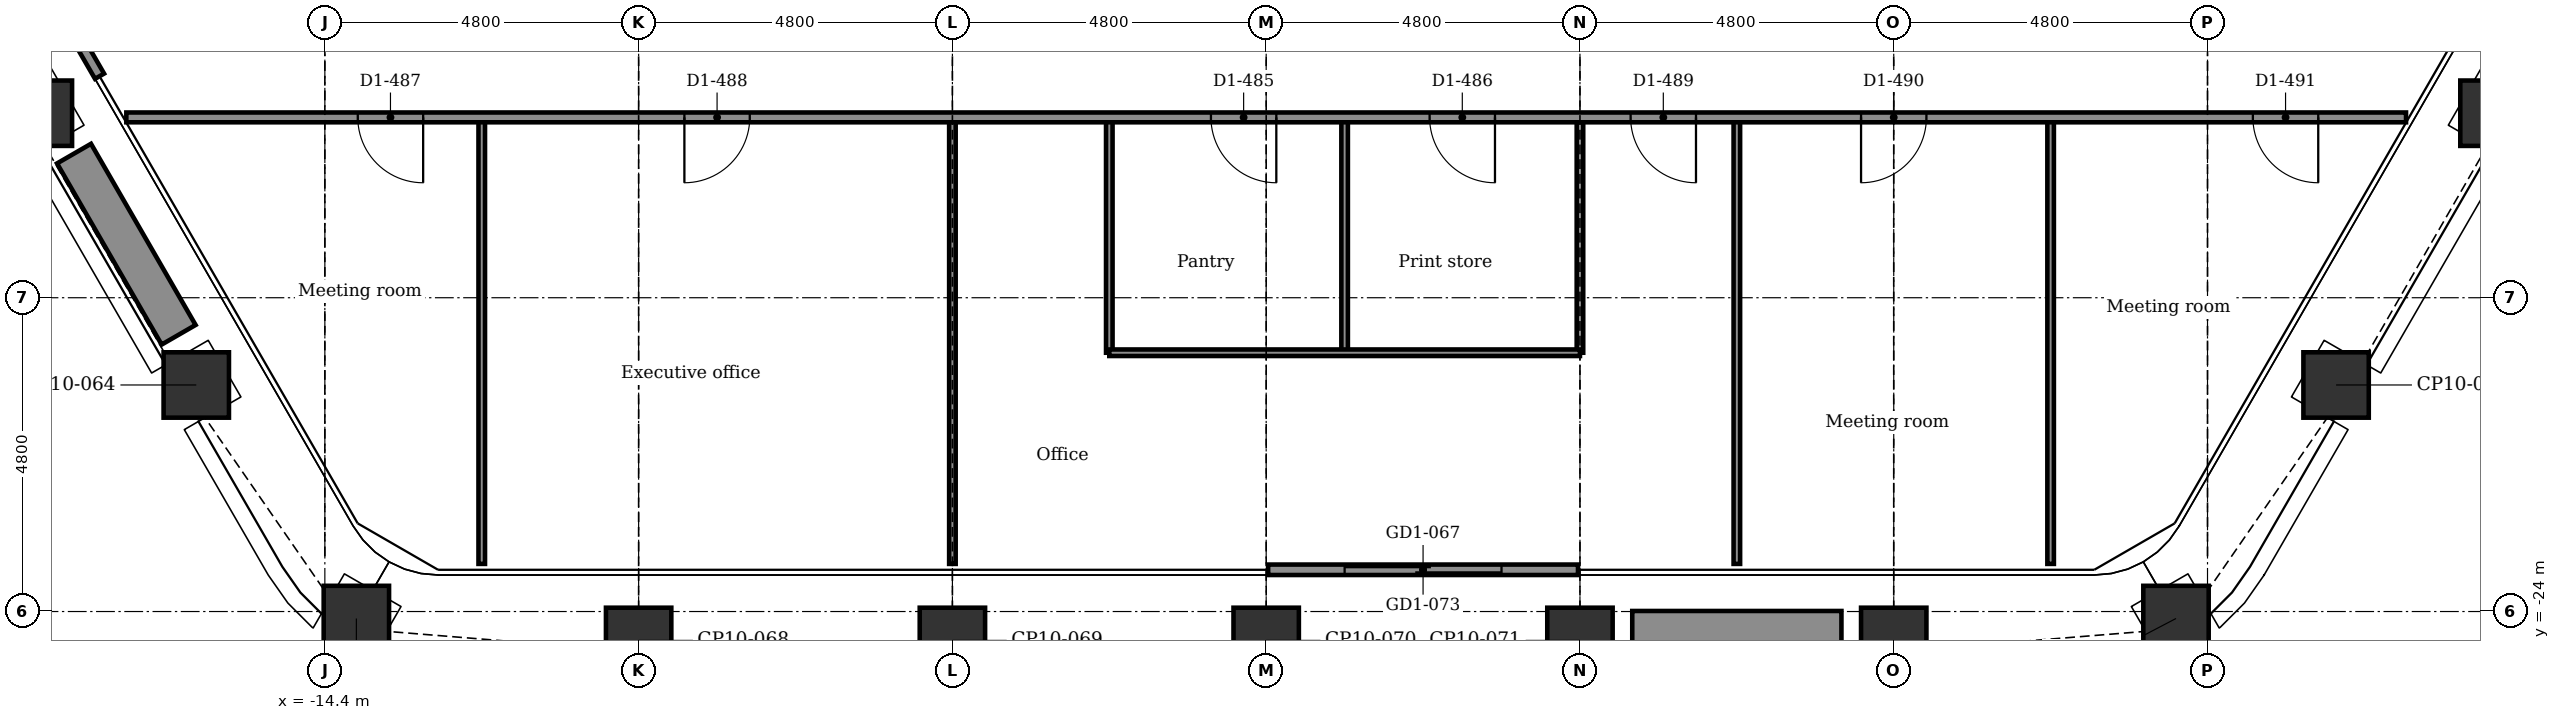
"""IFC4 building model, lengths in metres.
Left out: names, types, materials, properties, quantities, classifications, styles, units other than length and angle.
Written with IfcOpenShell. Run it as: python <this file> out.ifc"""

import sys

from ifc_helpers import new_model, si_unit, direction, frame, frame_2d, origin, origin_2d, place, context, subcontext, project, spatial, rectangle, extrude, element, fill, save


model = new_model("IFC4")
c1 = context("Model", 3, precision=1e-05, world=origin(), true_north=direction((0.0, 1.0)))
c2 = subcontext(c1, "Body", "Model", "MODEL_VIEW")
j1 = project(units=[si_unit("LENGTHUNIT", "METRE"), si_unit("PLANEANGLEUNIT", "RADIAN")], contexts=[c1])
p1 = place(None, origin())
s1 = spatial("IfcSite", under=j1, at=p1, CompositionType="ELEMENT")
p2 = place(p1, origin())
s2 = spatial("IfcBuilding", under=s1, at=p2, CompositionType="ELEMENT")
p3 = place(p2, frame((0.0, 0.0, 170.0)))
s3 = spatial("IfcBuildingStorey", under=s2, at=p3, CompositionType="ELEMENT", Elevation=170.0)
for number, where, z_axis, x_axis in (
    (1, (18.767, -16.378, -0.15), (0.0, 0.0, 1.0), (0.5, 0.866, 0.0)),
    (2, (16.367, -20.535, -0.15), (0.0, 0.0, 1.0), (0.5, 0.866, 0.0)),
    (3, (13.918, -24.107, -0.15), (0.0, 0.0, 1.0), (0.866, 0.5, 0.0)),
    (4, (9.6, -24.442, -0.15), (0.0, 0.0, 1.0), (1.0, 0.0, 0.0)),
    (5, (4.8, -24.442, -0.15), (0.0, 0.0, 1.0), (1.0, 0.0, 0.0)),
    (6, (0.0, -24.442, -0.15), (0.0, 0.0, 1.0), (1.0, 0.0, 0.0)),
    (7, (-4.8, -24.442, -0.15), (0.0, 0.0, 1.0), (1.0, 0.0, 0.0)),
    (8, (-9.6, -24.442, -0.15), (0.0, 0.0, 1.0), (1.0, 0.0, 0.0)),
    (9, (-13.918, -24.107, -0.15), (0.0, 0.0, 1.0), (0.5, 0.866, 0.0)),
    (10, (-16.367, -20.535, -0.15), (0.0, 0.0, 1.0), (0.866, 0.5, 0.0)),
    (11, (-18.767, -16.378, -0.15), (0.0, 0.0, 1.0), (0.866, 0.5, 0.0)),
):
    element("IfcColumn", number, at=place(p3, frame(where, z_axis=z_axis, x_axis=x_axis)), inside=s3, PredefinedType="COLUMN", context=c2, shape_type="SweptSolid", body=[
        extrude(rectangle(XDim=1.0, YDim=1.0, at=origin_2d()), origin(), (0.0, 0.0, 1.0), 3.9),
    ])
p4 = place(p3, frame((4.77, -23.362, 0.0), z_axis=(0.0, 0.0, 1.0), x_axis=(-1.0, 0.0, 0.0)))
e12 = element("IfcWall", 12, at=p4, inside=s3, PredefinedType="PARTITIONING", context=c2, shape_type="SweptSolid", body=[
    extrude(rectangle(XDim=4.74, YDim=0.16, at=frame_2d((2.37, 0.0))), origin(), (0.0, 0.0, 1.0), 3.75),
])
p5 = place(p4, frame((1.17, 0.0, 0.0)))
e13 = element("IfcOpeningElement", 13, at=p5, cuts=e12, PredefinedType="OPENING", context=c2, shape_type="SweptSolid", body=[
    extrude(rectangle(XDim=2.4, YDim=2.4, at=frame_2d((1.2, 1.2))), frame((0.0, 0.09, 0.0), z_axis=(0.0, -1.0, 0.0), x_axis=(1.0, 0.0, 0.0)), (0.0, 0.0, 1.0), 0.18),
])
p6 = place(p3, frame((-17.847, -15.812, 0.0), z_axis=(0.0, 0.0, 1.0), x_axis=(-0.5000167099, 0.866015756104, 0.0)))
e14 = element("IfcWall", 14, at=p6, inside=s3, PredefinedType="PARTITIONING", context=c2, shape_type="SweptSolid", body=[
    extrude(rectangle(XDim=4.74, YDim=0.16, at=frame_2d((2.37, 0.0))), origin(), (0.0, 0.0, 1.0), 3.75),
])
p7 = place(p6, frame((1.17, 0.0, 0.0)))
e15 = element("IfcOpeningElement", 15, at=p7, cuts=e14, PredefinedType="OPENING", context=c2, shape_type="SweptSolid", body=[
    extrude(rectangle(XDim=2.4, YDim=2.4, at=frame_2d((1.2, 1.2))), frame((0.0, 0.09, 0.0), z_axis=(0.0, -1.0, 0.0), x_axis=(1.0, 0.0, 0.0)), (0.0, 0.0, 1.0), 0.18),
])
for number, where, z_axis, x_axis in (
    (16, (8.8, -24.292, 0.0), (0.0, 0.0, 1.0), (-1.0, 0.0, 0.0)),
    (17, (-16.637, -19.767, 0.0), (0.0, 0.0, 1.0), (-0.5, 0.866, 0.0)),
):
    element("IfcWall", number, at=place(p3, frame(where, z_axis=z_axis, x_axis=x_axis)), inside=s3, PredefinedType="USERDEFINED", context=c2, shape_type="SweptSolid", body=[
        extrude(rectangle(XDim=3.2, YDim=0.6, at=frame_2d((1.6, 0.0))), origin(), (0.0, 0.0, 1.0), 0.7),
    ])
for number, where, z_axis, x_axis in (
    (18, (12.0, -23.271, 0.0), (0.0, 0.0, 1.0), (0.0, 1.0, 0.0)),
    (19, (7.2, -23.271, 0.0), (0.0, 0.0, 1.0), (0.0, 1.0, 0.0)),
):
    element("IfcWall", number, at=place(p3, frame(where, z_axis=z_axis, x_axis=x_axis)), inside=s3, PredefinedType="PARTITIONING", context=c2, shape_type="SweptSolid", body=[
        extrude(rectangle(XDim=6.83, YDim=0.1, at=frame_2d((3.415, 0.0))), origin(), (0.0, 0.0, 1.0), 3.75),
    ])
p8 = place(p3, frame((4.8, -20.042, 0.0), z_axis=(0.0, 0.0, 1.0), x_axis=(0.0, 1.0, 0.0)))
e20 = element("IfcWall", 20, at=p8, inside=s3, PredefinedType="PARTITIONING", context=c2, shape_type="SweptSolid", body=[
    extrude(rectangle(XDim=3.6, YDim=0.1, at=frame_2d((1.8, 0.0))), origin(), (0.0, 0.0, 1.0), 3.066),
])
for number, where, z_axis, x_axis in (
    (21, (1.2, -20.042, 0.0), (0.0, 0.0, 1.0), (0.0, 1.0, 0.0)),
    (22, (-2.4, -20.042, 0.0), (0.0, 0.0, 1.0), (0.0, 1.0, 0.0)),
):
    element("IfcWall", number, at=place(p3, frame(where, z_axis=z_axis, x_axis=x_axis)), inside=s3, PredefinedType="PARTITIONING", context=c2, shape_type="SweptSolid", body=[
        extrude(rectangle(XDim=3.6, YDim=0.1, at=frame_2d((1.8, 0.0))), origin(), (0.0, 0.0, 1.0), 3.75),
    ])
p9 = place(p3, frame((-4.8, -23.271, 0.0), z_axis=(0.0, 0.0, 1.0), x_axis=(0.0, 1.0, 0.0)))
e23 = element("IfcWall", 23, at=p9, inside=s3, PredefinedType="PARTITIONING", context=c2, shape_type="SweptSolid", body=[
    extrude(rectangle(XDim=6.83, YDim=0.1, at=frame_2d((3.415, 0.0))), origin(), (0.0, 0.0, 1.0), 3.066),
])
p10 = place(p3, frame((-12.0, -23.271, 0.0), z_axis=(0.0, 0.0, 1.0), x_axis=(0.0, 1.0, 0.0)))
e24 = element("IfcWall", 24, at=p10, inside=s3, PredefinedType="PARTITIONING", context=c2, shape_type="SweptSolid", body=[
    extrude(rectangle(XDim=6.83, YDim=0.1, at=frame_2d((3.415, 0.0))), origin(), (0.0, 0.0, 1.0), 3.75),
])
p11 = place(p3, frame((-2.4, -20.042, 0.0), z_axis=(0.0, 0.0, 1.0), x_axis=(1.0, 0.0, 0.0)))
e25 = element("IfcWall", 25, at=p11, inside=s3, PredefinedType="PARTITIONING", context=c2, shape_type="SweptSolid", body=[
    extrude(rectangle(XDim=7.2, YDim=0.1, at=frame_2d((3.6, 0.0))), origin(), (0.0, 0.0, 1.0), 3.75),
])
p12 = place(p3, frame((-17.437, -16.441, 0.0), z_axis=(0.0, 0.0, 1.0), x_axis=(1.0, 0.0, 0.0)))
e26 = element("IfcWall", 26, at=p12, inside=s3, PredefinedType="PARTITIONING", context=c2, shape_type="SweptSolid", body=[
    extrude(rectangle(XDim=34.874, YDim=0.15, at=frame_2d((17.437, 0.0))), origin(), (0.0, 0.0, 1.0), 3.75),
])
p13 = place(p12, frame((16.592, 0.0, 0.0)))
e27 = element("IfcOpeningElement", 27, at=p13, cuts=e26, PredefinedType="OPENING", context=c2, shape_type="SweptSolid", body=[
    extrude(rectangle(XDim=1.0, YDim=2.1, at=frame_2d((0.5, 1.05))), frame((0.0, 0.085, 0.0), z_axis=(0.0, -1.0, 0.0), x_axis=(1.0, 0.0, 0.0)), (0.0, 0.0, 1.0), 0.17),
])
p14 = place(p12, frame((19.937, 0.0, 0.0)))
e28 = element("IfcOpeningElement", 28, at=p14, cuts=e26, PredefinedType="OPENING", context=c2, shape_type="SweptSolid", body=[
    extrude(rectangle(XDim=1.0, YDim=2.1, at=frame_2d((0.5, 1.05))), frame((0.0, 0.085, 0.0), z_axis=(0.0, -1.0, 0.0), x_axis=(1.0, 0.0, 0.0)), (0.0, 0.0, 1.0), 0.17),
])
p15 = place(p12, frame((3.541, 0.0, 0.0)))
e29 = element("IfcOpeningElement", 29, at=p15, cuts=e26, PredefinedType="OPENING", context=c2, shape_type="SweptSolid", body=[
    extrude(rectangle(XDim=1.0, YDim=2.1, at=frame_2d((0.5, 1.05))), frame((0.0, 0.085, 0.0), z_axis=(0.0, -1.0, 0.0), x_axis=(1.0, 0.0, 0.0)), (0.0, 0.0, 1.0), 0.17),
])
p16 = place(p12, frame((8.537, 0.0, 0.0)))
e30 = element("IfcOpeningElement", 30, at=p16, cuts=e26, PredefinedType="OPENING", context=c2, shape_type="SweptSolid", body=[
    extrude(rectangle(XDim=1.0, YDim=2.1, at=frame_2d((0.5, 1.05))), frame((0.0, 0.085, 0.0), z_axis=(0.0, -1.0, 0.0), x_axis=(1.0, 0.0, 0.0)), (0.0, 0.0, 1.0), 0.17),
])
p17 = place(p12, frame((23.012, 0.0, 0.0)))
e31 = element("IfcOpeningElement", 31, at=p17, cuts=e26, PredefinedType="OPENING", context=c2, shape_type="SweptSolid", body=[
    extrude(rectangle(XDim=1.0, YDim=2.1, at=frame_2d((0.5, 1.05))), frame((0.0, 0.085, 0.0), z_axis=(0.0, -1.0, 0.0), x_axis=(1.0, 0.0, 0.0)), (0.0, 0.0, 1.0), 0.17),
])
p18 = place(p12, frame((26.537, 0.0, 0.0)))
e32 = element("IfcOpeningElement", 32, at=p18, cuts=e26, PredefinedType="OPENING", context=c2, shape_type="SweptSolid", body=[
    extrude(rectangle(XDim=1.0, YDim=2.1, at=frame_2d((0.5, 1.05))), frame((0.0, 0.085, 0.0), z_axis=(0.0, -1.0, 0.0), x_axis=(1.0, 0.0, 0.0)), (0.0, 0.0, 1.0), 0.17),
])
p19 = place(p12, frame((32.531, 0.0, 0.0)))
e33 = element("IfcOpeningElement", 33, at=p19, cuts=e26, PredefinedType="OPENING", context=c2, shape_type="SweptSolid", body=[
    extrude(rectangle(XDim=1.0, YDim=2.1, at=frame_2d((0.5, 1.05))), frame((0.0, 0.085, 0.0), z_axis=(0.0, -1.0, 0.0), x_axis=(1.0, 0.0, 0.0)), (0.0, 0.0, 1.0), 0.17),
])
p20 = place(p5, origin())
e34 = element("IfcDoor", 34, at=p20, inside=s3, OperationType="DOUBLE_DOOR_SLIDING", PredefinedType="DOOR", context=c2, shape_type="SweptSolid", body=[
    extrude(rectangle(XDim=2.4, YDim=2.4, at=frame_2d((1.2, 1.2))), frame((0.0, 0.025, 0.0), z_axis=(0.0, -1.0, 0.0), x_axis=(1.0, 0.0, 0.0)), (0.0, 0.0, 1.0), 0.05),
])
fill(e13, e34)
p21 = place(p13, frame((1.0, 0.0, 0.0), z_axis=(0.0, 0.0, 1.0), x_axis=(-1.0, 0.0, 0.0)))
e35 = element("IfcDoor", 35, at=p21, inside=s3, OperationType="SINGLE_SWING_RIGHT", PredefinedType="DOOR", context=c2, shape_type="SweptSolid", body=[
    extrude(rectangle(XDim=1.0, YDim=2.1, at=frame_2d((0.5, 1.05))), frame((0.0, 0.025, 0.0), z_axis=(0.0, -1.0, 0.0), x_axis=(1.0, 0.0, 0.0)), (0.0, 0.0, 1.0), 0.05),
])
fill(e27, e35)
p22 = place(p14, frame((1.0, 0.0, 0.0), z_axis=(0.0, 0.0, 1.0), x_axis=(-1.0, 0.0, 0.0)))
e36 = element("IfcDoor", 36, at=p22, inside=s3, OperationType="SINGLE_SWING_RIGHT", PredefinedType="DOOR", context=c2, shape_type="SweptSolid", body=[
    extrude(rectangle(XDim=1.0, YDim=2.1, at=frame_2d((0.5, 1.05))), frame((0.0, 0.025, 0.0), z_axis=(0.0, -1.0, 0.0), x_axis=(1.0, 0.0, 0.0)), (0.0, 0.0, 1.0), 0.05),
])
fill(e28, e36)
p23 = place(p15, frame((1.0, 0.0, 0.0), z_axis=(0.0, 0.0, 1.0), x_axis=(-1.0, 0.0, 0.0)))
e37 = element("IfcDoor", 37, at=p23, inside=s3, OperationType="SINGLE_SWING_RIGHT", PredefinedType="DOOR", context=c2, shape_type="SweptSolid", body=[
    extrude(rectangle(XDim=1.0, YDim=2.1, at=frame_2d((0.5, 1.05))), frame((0.0, 0.025, 0.0), z_axis=(0.0, -1.0, 0.0), x_axis=(1.0, 0.0, 0.0)), (0.0, 0.0, 1.0), 0.05),
])
fill(e29, e37)
p24 = place(p16, frame((1.0, 0.0, 0.0), z_axis=(0.0, 0.0, 1.0), x_axis=(-1.0, 0.0, 0.0)))
e38 = element("IfcDoor", 38, at=p24, inside=s3, OperationType="SINGLE_SWING_LEFT", PredefinedType="DOOR", context=c2, shape_type="SweptSolid", body=[
    extrude(rectangle(XDim=1.0, YDim=2.1, at=frame_2d((0.5, 1.05))), frame((0.0, 0.025, 0.0), z_axis=(0.0, -1.0, 0.0), x_axis=(1.0, 0.0, 0.0)), (0.0, 0.0, 1.0), 0.05),
])
fill(e30, e38)
p25 = place(p17, frame((1.0, 0.0, 0.0), z_axis=(0.0, 0.0, 1.0), x_axis=(-1.0, 0.0, 0.0)))
e39 = element("IfcDoor", 39, at=p25, inside=s3, OperationType="SINGLE_SWING_RIGHT", PredefinedType="DOOR", context=c2, shape_type="SweptSolid", body=[
    extrude(rectangle(XDim=1.0, YDim=2.1, at=frame_2d((0.5, 1.05))), frame((0.0, 0.025, 0.0), z_axis=(0.0, -1.0, 0.0), x_axis=(1.0, 0.0, 0.0)), (0.0, 0.0, 1.0), 0.05),
])
fill(e31, e39)
p26 = place(p18, frame((1.0, 0.0, 0.0), z_axis=(0.0, 0.0, 1.0), x_axis=(-1.0, 0.0, 0.0)))
e40 = element("IfcDoor", 40, at=p26, inside=s3, OperationType="SINGLE_SWING_LEFT", PredefinedType="DOOR", context=c2, shape_type="SweptSolid", body=[
    extrude(rectangle(XDim=1.0, YDim=2.1, at=frame_2d((0.5, 1.05))), frame((0.0, 0.025, 0.0), z_axis=(0.0, -1.0, 0.0), x_axis=(1.0, 0.0, 0.0)), (0.0, 0.0, 1.0), 0.05),
])
fill(e32, e40)
p27 = place(p19, frame((1.0, 0.0, 0.0), z_axis=(0.0, 0.0, 1.0), x_axis=(-1.0, 0.0, 0.0)))
e41 = element("IfcDoor", 41, at=p27, inside=s3, OperationType="SINGLE_SWING_RIGHT", PredefinedType="DOOR", context=c2, shape_type="SweptSolid", body=[
    extrude(rectangle(XDim=1.0, YDim=2.1, at=frame_2d((0.5, 1.05))), frame((0.0, 0.025, 0.0), z_axis=(0.0, -1.0, 0.0), x_axis=(1.0, 0.0, 0.0)), (0.0, 0.0, 1.0), 0.05),
])
fill(e33, e41)
save(model, sys.argv[1])
